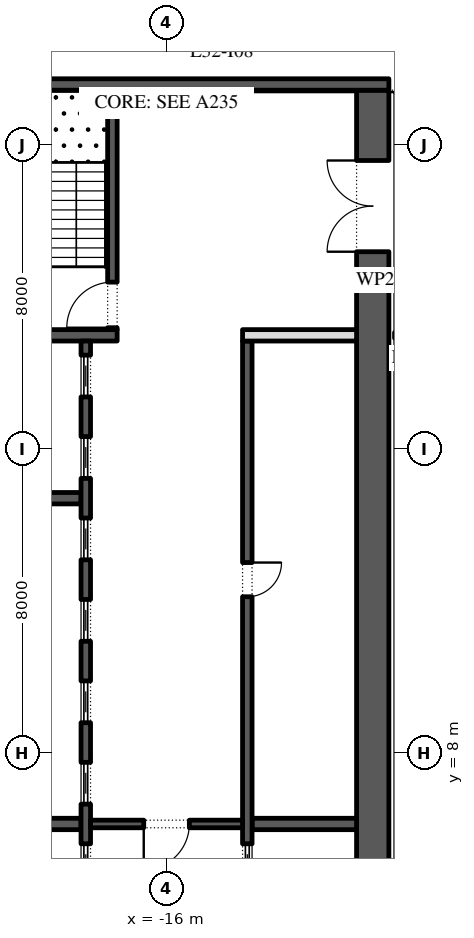
"""IFC4 building model, lengths in metres.
Left out: names, types, materials, properties, quantities, classifications, styles, units other than length and angle.
Written with IfcOpenShell. Run it as: python <this file> out.ifc"""

import sys

from ifc_helpers import new_model, si_unit, direction, frame, frame_2d, origin, place, context, subcontext, project, spatial, rectangle, extrude, element, fill, save


model = new_model("IFC4")
c1 = context("Model", 3, precision=1e-05, world=origin(), true_north=direction((0.0, 1.0)))
c2 = subcontext(c1, "Body", "Model", "MODEL_VIEW")
j1 = project(units=[si_unit("LENGTHUNIT", "METRE"), si_unit("PLANEANGLEUNIT", "RADIAN")], contexts=[c1])
p1 = place(None, origin())
s1 = spatial("IfcSite", under=j1, at=p1, CompositionType="ELEMENT")
p2 = place(p1, origin())
s2 = spatial("IfcBuilding", under=s1, at=p2, CompositionType="ELEMENT")
p3 = place(p2, frame((0.0, 0.0, 147.6)))
s3 = spatial("IfcBuildingStorey", under=s2, at=p3, CompositionType="ELEMENT", Elevation=147.6)
p4 = place(p3, frame((-10.575, -2.45, 0.0), z_axis=(0.0, 0.0, 1.0), x_axis=(0.0, 1.0, 0.0)))
e1 = element("IfcWall", 1, at=p4, inside=s3, PredefinedType="SHEAR", context=c2, shape_type="SweptSolid", body=[
    extrude(rectangle(XDim=27.9, YDim=0.85, at=frame_2d((13.95, 0.0))), origin(), (0.0, 0.0, 1.0), 4.0),
])
p5 = place(p4, frame((23.65, 0.0, 0.0)))
e2 = element("IfcOpeningElement", 2, at=p5, cuts=e1, PredefinedType="OPENING", context=c2, shape_type="SweptSolid", body=[
    extrude(rectangle(XDim=2.4, YDim=2.1, at=frame_2d((1.2, 1.05))), frame((0.0, 0.435, 0.0), z_axis=(0.0, -1.0, 0.0), x_axis=(1.0, 0.0, 0.0)), (0.0, 0.0, 1.0), 0.87),
])
p6 = place(p4, frame((1.087, 0.0, 0.0)))
e3 = element("IfcOpeningElement", 3, at=p6, cuts=e1, PredefinedType="OPENING", context=c2, shape_type="SweptSolid", body=[
    extrude(rectangle(XDim=0.9, YDim=2.1, at=frame_2d((0.45, 1.05))), frame((0.0, 0.435, 0.0), z_axis=(0.0, -1.0, 0.0), x_axis=(1.0, 0.0, 0.0)), (0.0, 0.0, 1.0), 0.87),
])
p7 = place(p4, frame((4.262, 0.0, 0.0)))
e4 = element("IfcOpeningElement", 4, at=p7, cuts=e1, PredefinedType="OPENING", context=c2, shape_type="SweptSolid", body=[
    extrude(rectangle(XDim=1.0, YDim=2.1, at=frame_2d((0.5, 1.05))), frame((0.0, 0.435, 0.0), z_axis=(0.0, -1.0, 0.0), x_axis=(1.0, 0.0, 0.0)), (0.0, 0.0, 1.0), 0.87),
])
p8 = place(p3, frame((-21.85, 25.6, 0.0), z_axis=(0.0, 0.0, 1.0), x_axis=(1.0, 0.0, 0.0)))
e5 = element("IfcWall", 5, at=p8, inside=s3, PredefinedType="SHEAR", context=c2, shape_type="SweptSolid", body=[
    extrude(rectangle(XDim=11.7, YDim=0.3, at=frame_2d((5.85, 0.0))), origin(), (0.0, 0.0, 1.0), 4.0),
])
p9 = place(p3, frame((-21.0, 19.0, 0.0), z_axis=(0.0, 0.0, 1.0), x_axis=(1.0, 0.0, 0.0)))
e6 = element("IfcWall", 6, at=p9, inside=s3, PredefinedType="SHEAR", context=c2, shape_type="SweptSolid", body=[
    extrude(rectangle(XDim=3.7, YDim=0.3, at=frame_2d((1.85, 0.0))), origin(), (0.0, 0.0, 1.0), 4.0),
])
p10 = place(p3, frame((-17.425, 19.15, 0.0), z_axis=(0.0, 0.0, 1.0), x_axis=(0.0, 1.0, 0.0)))
e7 = element("IfcWall", 7, at=p10, inside=s3, PredefinedType="SHEAR", context=c2, shape_type="SweptSolid", body=[
    extrude(rectangle(XDim=6.3, YDim=0.25, at=frame_2d((3.15, 0.0))), origin(), (0.0, 0.0, 1.0), 4.0),
])
p11 = place(p10, frame((0.05, 0.0, 0.0)))
e8 = element("IfcOpeningElement", 8, at=p11, cuts=e7, PredefinedType="OPENING", context=c2, shape_type="SweptSolid", body=[
    extrude(rectangle(XDim=1.2, YDim=2.1, at=frame_2d((0.6, 1.05))), frame((0.0, 0.135, 0.0), z_axis=(0.0, -1.0, 0.0), x_axis=(1.0, 0.0, 0.0)), (0.0, 0.0, 1.0), 0.27),
])
for number, where, z_axis, x_axis in (
    (9, (-21.0, 6.143, 0.0), (0.0, 0.0, 1.0), (1.0, 0.0, 0.0)),
    (10, (-21.0, 14.714, 0.0), (0.0, 0.0, 1.0), (1.0, 0.0, 0.0)),
):
    element("IfcWall", number, at=place(p3, frame(where, z_axis=z_axis, x_axis=x_axis)), inside=s3, PredefinedType="SHEAR", context=c2, shape_type="SweptSolid", body=[
        extrude(rectangle(XDim=2.75, YDim=0.3, at=frame_2d((1.375, 0.0))), origin(), (0.0, 0.0, 1.0), 4.0),
    ])
p12 = place(p3, frame((-18.125, 4.15, 0.0), z_axis=(0.0, 0.0, 1.0), x_axis=(0.0, 1.0, 0.0)))
e11 = element("IfcWall", 11, at=p12, inside=s3, PredefinedType="SHEAR", context=c2, shape_type="SweptSolid", body=[
    extrude(rectangle(XDim=14.7, YDim=0.25, at=frame_2d((7.35, 0.0))), origin(), (0.0, 0.0, 1.0), 4.0),
])
p13 = place(p12, frame((0.371, 0.0, 0.0)))
e12 = element("IfcOpeningElement", 12, at=p13, cuts=e11, PredefinedType="OPENING", context=c2, shape_type="SweptSolid", body=[
    extrude(rectangle(XDim=1.1, YDim=2.1, at=frame_2d((0.55, 1.05))), frame((0.0, 0.135, 0.0), z_axis=(0.0, -1.0, 0.0), x_axis=(1.0, 0.0, 0.0)), (0.0, 0.0, 1.0), 0.27),
])
p14 = place(p12, frame((2.514, 0.0, 0.0)))
e13 = element("IfcOpeningElement", 13, at=p14, cuts=e11, PredefinedType="OPENING", context=c2, shape_type="SweptSolid", body=[
    extrude(rectangle(XDim=1.1, YDim=2.1, at=frame_2d((0.55, 1.05))), frame((0.0, 0.135, 0.0), z_axis=(0.0, -1.0, 0.0), x_axis=(1.0, 0.0, 0.0)), (0.0, 0.0, 1.0), 0.27),
])
p15 = place(p12, frame((4.657, 0.0, 0.0)))
e14 = element("IfcOpeningElement", 14, at=p15, cuts=e11, PredefinedType="OPENING", context=c2, shape_type="SweptSolid", body=[
    extrude(rectangle(XDim=1.1, YDim=2.1, at=frame_2d((0.55, 1.05))), frame((0.0, 0.135, 0.0), z_axis=(0.0, -1.0, 0.0), x_axis=(1.0, 0.0, 0.0)), (0.0, 0.0, 1.0), 0.27),
])
p16 = place(p12, frame((6.8, 0.0, 0.0)))
e15 = element("IfcOpeningElement", 15, at=p16, cuts=e11, PredefinedType="OPENING", context=c2, shape_type="SweptSolid", body=[
    extrude(rectangle(XDim=1.1, YDim=2.1, at=frame_2d((0.55, 1.05))), frame((0.0, 0.135, 0.0), z_axis=(0.0, -1.0, 0.0), x_axis=(1.0, 0.0, 0.0)), (0.0, 0.0, 1.0), 0.27),
])
p17 = place(p12, frame((8.943, 0.0, 0.0)))
e16 = element("IfcOpeningElement", 16, at=p17, cuts=e11, PredefinedType="OPENING", context=c2, shape_type="SweptSolid", body=[
    extrude(rectangle(XDim=1.1, YDim=2.1, at=frame_2d((0.55, 1.05))), frame((0.0, 0.135, 0.0), z_axis=(0.0, -1.0, 0.0), x_axis=(1.0, 0.0, 0.0)), (0.0, 0.0, 1.0), 0.27),
])
p18 = place(p12, frame((11.086, 0.0, 0.0)))
e17 = element("IfcOpeningElement", 17, at=p18, cuts=e11, PredefinedType="OPENING", context=c2, shape_type="SweptSolid", body=[
    extrude(rectangle(XDim=1.1, YDim=2.1, at=frame_2d((0.55, 1.05))), frame((0.0, 0.135, 0.0), z_axis=(0.0, -1.0, 0.0), x_axis=(1.0, 0.0, 0.0)), (0.0, 0.0, 1.0), 0.27),
])
p19 = place(p12, frame((13.229, 0.0, 0.0)))
e18 = element("IfcOpeningElement", 18, at=p19, cuts=e11, PredefinedType="OPENING", context=c2, shape_type="SweptSolid", body=[
    extrude(rectangle(XDim=1.1, YDim=2.1, at=frame_2d((0.55, 1.05))), frame((0.0, 0.135, 0.0), z_axis=(0.0, -1.0, 0.0), x_axis=(1.0, 0.0, 0.0)), (0.0, 0.0, 1.0), 0.27),
])
p20 = place(p3, frame((-13.75, 6.143, 0.0), z_axis=(0.0, 0.0, 1.0), x_axis=(1.0, 0.0, 0.0)))
e19 = element("IfcWall", 19, at=p20, inside=s3, PredefinedType="SHEAR", context=c2, shape_type="SweptSolid", body=[
    extrude(rectangle(XDim=2.75, YDim=0.3, at=frame_2d((1.375, 0.0))), origin(), (0.0, 0.0, 1.0), 4.0),
])
p21 = place(p3, frame((-13.875, -2.45, 0.0), z_axis=(0.0, 0.0, 1.0), x_axis=(0.0, 1.0, 0.0)))
e20 = element("IfcWall", 20, at=p21, inside=s3, PredefinedType="SHEAR", context=c2, shape_type="SweptSolid", body=[
    extrude(rectangle(XDim=21.3, YDim=0.25, at=frame_2d((10.65, 0.0))), origin(), (0.0, 0.0, 1.0), 4.0),
])
p22 = place(p21, frame((14.571, 0.0, 0.0)))
e21 = element("IfcOpeningElement", 21, at=p22, cuts=e20, PredefinedType="OPENING", context=c2, shape_type="SweptSolid", body=[
    extrude(rectangle(XDim=0.9, YDim=2.1, at=frame_2d((0.45, 1.05))), frame((0.0, 0.135, 0.0), z_axis=(0.0, -1.0, 0.0), x_axis=(1.0, 0.0, 0.0)), (0.0, 0.0, 1.0), 0.27),
])
p23 = place(p21, frame((6.971, 0.0, 0.0)))
e22 = element("IfcOpeningElement", 22, at=p23, cuts=e20, PredefinedType="OPENING", context=c2, shape_type="SweptSolid", body=[
    extrude(rectangle(XDim=1.1, YDim=2.1, at=frame_2d((0.55, 1.05))), frame((0.0, 0.135, 0.0), z_axis=(0.0, -1.0, 0.0), x_axis=(1.0, 0.0, 0.0)), (0.0, 0.0, 1.0), 0.27),
])
p24 = place(p3, frame((-14.0, 19.0, 0.0), z_axis=(0.0, 0.0, 1.0), x_axis=(1.0, 0.0, 0.0)))
e23 = element("IfcWall", 23, at=p24, inside=s3, PredefinedType="PARTITIONING", context=c2, shape_type="SweptSolid", body=[
    extrude(rectangle(XDim=3.0, YDim=0.3, at=frame_2d((1.5, 0.0))), origin(), (0.0, 0.0, 1.0), 4.0),
])
p25 = place(p3, frame((-18.0, 6.143, 0.0), z_axis=(0.0, 0.0, 1.0), x_axis=(1.0, 0.0, 0.0)))
e24 = element("IfcWall", 24, at=p25, inside=s3, PredefinedType="SHEAR", context=c2, shape_type="SweptSolid", body=[
    extrude(rectangle(XDim=4.0, YDim=0.2, at=frame_2d((2.0, 0.0))), origin(), (0.0, 0.0, 1.0), 4.0),
])
p26 = place(p25, frame((1.4, 0.0, 0.0)))
e25 = element("IfcOpeningElement", 25, at=p26, cuts=e24, PredefinedType="OPENING", context=c2, shape_type="SweptSolid", body=[
    extrude(rectangle(XDim=1.2, YDim=2.1, at=frame_2d((0.6, 1.05))), frame((0.0, 0.11, 0.0), z_axis=(0.0, -1.0, 0.0), x_axis=(1.0, 0.0, 0.0)), (0.0, 0.0, 1.0), 0.22),
])
p27 = place(p3, frame((-10.0, 19.0, 0.0), z_axis=(0.0, 0.0, 1.0), x_axis=(1.0, 0.0, 0.0)))
e26 = element("IfcWall", 26, at=p27, inside=s3, PredefinedType="PARTITIONING", context=c2, shape_type="SweptSolid", body=[
    extrude(rectangle(XDim=1.515, YDim=0.15, at=frame_2d((0.757, 0.0))), origin(), (0.0, 0.0, 1.0), 4.0),
])
p28 = place(p27, frame((0.258, 0.0, 0.0)))
e27 = element("IfcOpeningElement", 27, at=p28, cuts=e26, PredefinedType="OPENING", context=c2, shape_type="SweptSolid", body=[
    extrude(rectangle(XDim=1.0, YDim=2.1, at=frame_2d((0.5, 1.05))), frame((0.0, 0.085, 0.0), z_axis=(0.0, -1.0, 0.0), x_axis=(1.0, 0.0, 0.0)), (0.0, 0.0, 1.0), 0.17),
])
p29 = place(p13, origin())
e28 = element("IfcDoor", 28, at=p29, inside=s3, OperationType="SLIDING_TO_LEFT", PredefinedType="DOOR", context=c2, shape_type="SweptSolid", body=[
    extrude(rectangle(XDim=1.1, YDim=2.1, at=frame_2d((0.55, 1.05))), frame((0.0, 0.025, 0.0), z_axis=(0.0, -1.0, 0.0), x_axis=(1.0, 0.0, 0.0)), (0.0, 0.0, 1.0), 0.05),
])
fill(e12, e28)
p30 = place(p14, origin())
e29 = element("IfcDoor", 29, at=p30, inside=s3, OperationType="SLIDING_TO_LEFT", PredefinedType="DOOR", context=c2, shape_type="SweptSolid", body=[
    extrude(rectangle(XDim=1.1, YDim=2.1, at=frame_2d((0.55, 1.05))), frame((0.0, 0.025, 0.0), z_axis=(0.0, -1.0, 0.0), x_axis=(1.0, 0.0, 0.0)), (0.0, 0.0, 1.0), 0.05),
])
fill(e13, e29)
p31 = place(p15, origin())
e30 = element("IfcDoor", 30, at=p31, inside=s3, OperationType="SLIDING_TO_LEFT", PredefinedType="DOOR", context=c2, shape_type="SweptSolid", body=[
    extrude(rectangle(XDim=1.1, YDim=2.1, at=frame_2d((0.55, 1.05))), frame((0.0, 0.025, 0.0), z_axis=(0.0, -1.0, 0.0), x_axis=(1.0, 0.0, 0.0)), (0.0, 0.0, 1.0), 0.05),
])
fill(e14, e30)
p32 = place(p16, origin())
e31 = element("IfcDoor", 31, at=p32, inside=s3, OperationType="SLIDING_TO_LEFT", PredefinedType="DOOR", context=c2, shape_type="SweptSolid", body=[
    extrude(rectangle(XDim=1.1, YDim=2.1, at=frame_2d((0.55, 1.05))), frame((0.0, 0.025, 0.0), z_axis=(0.0, -1.0, 0.0), x_axis=(1.0, 0.0, 0.0)), (0.0, 0.0, 1.0), 0.05),
])
fill(e15, e31)
p33 = place(p17, origin())
e32 = element("IfcDoor", 32, at=p33, inside=s3, OperationType="SLIDING_TO_LEFT", PredefinedType="DOOR", context=c2, shape_type="SweptSolid", body=[
    extrude(rectangle(XDim=1.1, YDim=2.1, at=frame_2d((0.55, 1.05))), frame((0.0, 0.025, 0.0), z_axis=(0.0, -1.0, 0.0), x_axis=(1.0, 0.0, 0.0)), (0.0, 0.0, 1.0), 0.05),
])
fill(e16, e32)
p34 = place(p18, origin())
e33 = element("IfcDoor", 33, at=p34, inside=s3, OperationType="SLIDING_TO_LEFT", PredefinedType="DOOR", context=c2, shape_type="SweptSolid", body=[
    extrude(rectangle(XDim=1.1, YDim=2.1, at=frame_2d((0.55, 1.05))), frame((0.0, 0.025, 0.0), z_axis=(0.0, -1.0, 0.0), x_axis=(1.0, 0.0, 0.0)), (0.0, 0.0, 1.0), 0.05),
])
fill(e17, e33)
p35 = place(p19, origin())
e34 = element("IfcDoor", 34, at=p35, inside=s3, OperationType="SLIDING_TO_LEFT", PredefinedType="DOOR", context=c2, shape_type="SweptSolid", body=[
    extrude(rectangle(XDim=1.1, YDim=2.1, at=frame_2d((0.55, 1.05))), frame((0.0, 0.025, 0.0), z_axis=(0.0, -1.0, 0.0), x_axis=(1.0, 0.0, 0.0)), (0.0, 0.0, 1.0), 0.05),
])
fill(e18, e34)
p36 = place(p22, frame((0.9, -0.2, 0.0), z_axis=(0.0, 0.0, 1.0), x_axis=(-1.0, 0.0, 0.0)))
e35 = element("IfcDoor", 35, at=p36, inside=s3, OperationType="SINGLE_SWING_RIGHT", PredefinedType="DOOR", context=c2, shape_type="SweptSolid", body=[
    extrude(rectangle(XDim=0.9, YDim=2.1, at=frame_2d((0.45, 1.05))), frame((0.0, -0.075, 0.0), z_axis=(0.0, -1.0, 0.0), x_axis=(1.0, 0.0, 0.0)), (0.0, 0.0, 1.0), 0.05),
])
fill(e21, e35)
p37 = place(p23, origin())
e36 = element("IfcDoor", 36, at=p37, inside=s3, OperationType="SLIDING_TO_LEFT", PredefinedType="DOOR", context=c2, shape_type="SweptSolid", body=[
    extrude(rectangle(XDim=1.1, YDim=2.1, at=frame_2d((0.55, 1.05))), frame((0.0, 0.025, 0.0), z_axis=(0.0, -1.0, 0.0), x_axis=(1.0, 0.0, 0.0)), (0.0, 0.0, 1.0), 0.05),
])
fill(e22, e36)
p38 = place(p26, frame((1.2, 0.0, 0.0), z_axis=(0.0, 0.0, 1.0), x_axis=(-1.0, 0.0, 0.0)))
e37 = element("IfcDoor", 37, at=p38, inside=s3, OperationType="SINGLE_SWING_LEFT", PredefinedType="DOOR", context=c2, shape_type="SweptSolid", body=[
    extrude(rectangle(XDim=1.2, YDim=2.1, at=frame_2d((0.6, 1.05))), frame((0.0, 0.025, 0.0), z_axis=(0.0, -1.0, 0.0), x_axis=(1.0, 0.0, 0.0)), (0.0, 0.0, 1.0), 0.05),
])
fill(e25, e37)
p39 = place(p5, origin())
e38 = element("IfcDoor", 38, at=p39, inside=s3, OperationType="DOUBLE_DOOR_SINGLE_SWING", PredefinedType="DOOR", context=c2, shape_type="SweptSolid", body=[
    extrude(rectangle(XDim=2.4, YDim=2.1, at=frame_2d((1.2, 1.05))), frame((0.0, 0.025, 0.0), z_axis=(0.0, -1.0, 0.0), x_axis=(1.0, 0.0, 0.0)), (0.0, 0.0, 1.0), 0.05),
])
fill(e2, e38)
p40 = place(p11, origin())
e39 = element("IfcDoor", 39, at=p40, inside=s3, OperationType="SINGLE_SWING_RIGHT", PredefinedType="DOOR", context=c2, shape_type="SweptSolid", body=[
    extrude(rectangle(XDim=1.2, YDim=2.1, at=frame_2d((0.6, 1.05))), frame((0.0, 0.025, 0.0), z_axis=(0.0, -1.0, 0.0), x_axis=(1.0, 0.0, 0.0)), (0.0, 0.0, 1.0), 0.05),
])
fill(e8, e39)
save(model, sys.argv[1])
